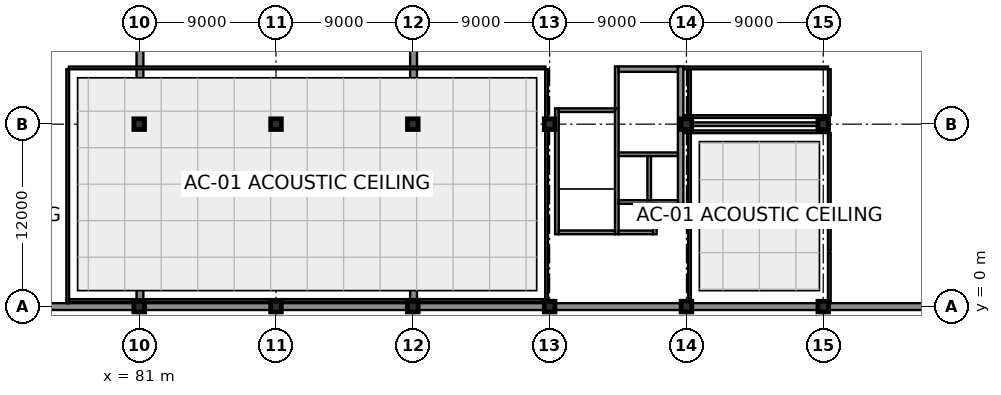
"""IFC4 building model, lengths in metres.
Left out: names, types, materials, properties, quantities, classifications, styles, units other than length and angle.
Written with IfcOpenShell. Run it as: python <this file> out.ifc"""

import sys

from ifc_helpers import new_model, si_unit, direction, frame, frame_2d, origin, origin_2d, place, context, subcontext, project, spatial, rectangle, extrude, element, fill, save


model = new_model("IFC4")
c1 = context("Model", 3, precision=1e-05, world=origin(), true_north=direction((0.0, 1.0)))
c2 = subcontext(c1, "Body", "Model", "MODEL_VIEW")
j1 = project(units=[si_unit("LENGTHUNIT", "METRE"), si_unit("PLANEANGLEUNIT", "RADIAN")], contexts=[c1])
p1 = place(None, origin())
s1 = spatial("IfcSite", under=j1, at=p1, CompositionType="ELEMENT")
p2 = place(p1, origin())
s2 = spatial("IfcBuilding", under=s1, at=p2, CompositionType="ELEMENT")
p3 = place(p2, frame((0.0, 0.0, -4.5)))
s3 = spatial("IfcBuildingStorey", under=s2, at=p3, CompositionType="ELEMENT", Elevation=-4.5)
for number, where, z_axis, x_axis in (
    (1, (81.0, 0.0, 0.0), (0.0, 0.0, 1.0), (1.0, 0.0, 0.0)),
    (2, (81.0, 12.0, 0.0), (0.0, 0.0, 1.0), (1.0, 0.0, 0.0)),
    (3, (90.0, 0.0, 0.0), (0.0, 0.0, 1.0), (1.0, 0.0, 0.0)),
    (4, (90.0, 12.0, 0.0), (0.0, 0.0, 1.0), (1.0, 0.0, 0.0)),
    (5, (99.0, 0.0, 0.0), (0.0, 0.0, 1.0), (1.0, 0.0, 0.0)),
    (6, (99.0, 12.0, 0.0), (0.0, 0.0, 1.0), (1.0, 0.0, 0.0)),
    (7, (108.0, 0.0, 0.0), (0.0, 0.0, 1.0), (1.0, 0.0, 0.0)),
    (8, (108.0, 12.0, 0.0), (0.0, 0.0, 1.0), (1.0, 0.0, 0.0)),
    (9, (117.0, 0.0, 0.0), (0.0, 0.0, 1.0), (1.0, 0.0, 0.0)),
    (10, (117.0, 12.0, 0.0), (0.0, 0.0, 1.0), (1.0, 0.0, 0.0)),
    (11, (126.0, 0.0, 0.0), (0.0, 0.0, 1.0), (1.0, 0.0, 0.0)),
    (12, (126.0, 12.0, 0.0), (0.0, 0.0, 1.0), (1.0, 0.0, 0.0)),
):
    element("IfcColumn", number, at=place(p3, frame(where, z_axis=z_axis, x_axis=x_axis)), inside=s3, PredefinedType="COLUMN", context=c2, shape_type="SweptSolid", body=[
        extrude(rectangle(XDim=0.7, YDim=0.7, at=origin_2d()), origin(), (0.0, 0.0, 1.0), 4.5),
    ])
p4 = place(p3, frame((99.396, 0.0, 0.0), z_axis=(0.0, 0.0, 1.0), x_axis=(1.0, 0.0, 0.0)))
e13 = element("IfcWall", 13, at=p4, inside=s3, PredefinedType="USERDEFINED", context=c2, shape_type="SweptSolid", body=[
    extrude(rectangle(XDim=8.258, YDim=0.45, at=frame_2d((4.129, 0.0))), origin(), (0.0, 0.0, 1.0), 4.32),
])
for number, where, z_axis, x_axis in (
    (14, (108.346, 0.0, 0.0), (0.0, 0.0, 1.0), (1.0, 0.0, 0.0)),
    (15, (117.346, 0.0, 0.0), (0.0, 0.0, 1.0), (1.0, 0.0, 0.0)),
):
    element("IfcWall", number, at=place(p3, frame(where, z_axis=z_axis, x_axis=x_axis)), inside=s3, PredefinedType="USERDEFINED", context=c2, shape_type="SweptSolid", body=[
        extrude(rectangle(XDim=8.308, YDim=0.45, at=frame_2d((4.154, 0.0))), origin(), (0.0, 0.0, 1.0), 4.32),
    ])
p5 = place(p3, frame((126.346, 0.0, 0.0), z_axis=(0.0, 0.0, 1.0), x_axis=(1.0, 0.0, 0.0)))
e16 = element("IfcWall", 16, at=p5, inside=s3, PredefinedType="USERDEFINED", context=c2, shape_type="SweptSolid", body=[
    extrude(rectangle(XDim=8.308, YDim=0.45, at=frame_2d((4.154, 0.0))), origin(), (0.0, 0.0, 1.0), 4.32),
])
p6 = place(p3, frame((99.05, 23.654, 0.0), z_axis=(0.0, 0.0, 1.0), x_axis=(0.0, -1.0, 0.0)))
e17 = element("IfcWall", 17, at=p6, inside=s3, PredefinedType="USERDEFINED", context=c2, shape_type="SweptSolid", body=[
    extrude(rectangle(XDim=11.308, YDim=0.45, at=frame_2d((5.654, 0.0))), origin(), (0.0, 0.0, 1.0), 4.32),
])
p7 = place(p3, frame((99.05, 11.654, 0.0), z_axis=(0.0, 0.0, 1.0), x_axis=(0.0, -1.0, 0.0)))
e18 = element("IfcWall", 18, at=p7, inside=s3, PredefinedType="USERDEFINED", context=c2, shape_type="SweptSolid", body=[
    extrude(rectangle(XDim=11.308, YDim=0.45, at=frame_2d((5.654, 0.0))), origin(), (0.0, 0.0, 1.0), 4.32),
])
for number, where, z_axis, x_axis in (
    (19, (81.396, 0.0, 0.0), (0.0, 0.0, 1.0), (1.0, 0.0, 0.0)),
    (20, (90.346, 0.0, 0.0), (0.0, 0.0, 1.0), (1.0, 0.0, 0.0)),
):
    element("IfcWall", number, at=place(p3, frame(where, z_axis=z_axis, x_axis=x_axis)), inside=s3, PredefinedType="USERDEFINED", context=c2, shape_type="SweptSolid", body=[
        extrude(rectangle(XDim=8.258, YDim=0.45, at=frame_2d((4.129, 0.0))), origin(), (0.0, 0.0, 1.0), 4.32),
    ])
p8 = place(p3, frame((81.05, 23.654, 0.0), z_axis=(0.0, 0.0, 1.0), x_axis=(0.0, -1.0, 0.0)))
e21 = element("IfcWall", 21, at=p8, inside=s3, PredefinedType="USERDEFINED", context=c2, shape_type="SweptSolid", body=[
    extrude(rectangle(XDim=11.308, YDim=0.45, at=frame_2d((5.654, 0.0))), origin(), (0.0, 0.0, 1.0), 4.32),
])
p9 = place(p3, frame((81.05, 11.654, 0.0), z_axis=(0.0, 0.0, 1.0), x_axis=(0.0, -1.0, 0.0)))
e22 = element("IfcWall", 22, at=p9, inside=s3, PredefinedType="USERDEFINED", context=c2, shape_type="SweptSolid", body=[
    extrude(rectangle(XDim=11.308, YDim=0.45, at=frame_2d((5.654, 0.0))), origin(), (0.0, 0.0, 1.0), 4.32),
])
p10 = place(p3, frame((72.346, 0.0, 0.0), z_axis=(0.0, 0.0, 1.0), x_axis=(1.0, 0.0, 0.0)))
e23 = element("IfcWall", 23, at=p10, inside=s3, PredefinedType="USERDEFINED", context=c2, shape_type="SweptSolid", body=[
    extrude(rectangle(XDim=8.258, YDim=0.45, at=frame_2d((4.129, 0.0))), origin(), (0.0, 0.0, 1.0), 4.32),
])
p11 = place(p3, frame((108.48, 4.76, 0.0), z_axis=(0.0, 0.0, 1.0), x_axis=(0.0, 1.0, 0.0)))
e24 = element("IfcWall", 24, at=p11, inside=s3, PredefinedType="SHEAR", context=c2, shape_type="SweptSolid", body=[
    extrude(rectangle(XDim=8.28, YDim=0.24, at=frame_2d((4.14, 0.0))), origin(), (0.0, 0.0, 1.0), 4.31),
])
p12 = place(p3, frame((112.42, 4.76, 0.0), z_axis=(0.0, 0.0, 1.0), x_axis=(0.0, 1.0, 0.0)))
e25 = element("IfcWall", 25, at=p12, inside=s3, PredefinedType="SHEAR", context=c2, shape_type="SweptSolid", body=[
    extrude(rectangle(XDim=8.28, YDim=0.24, at=frame_2d((4.14, 0.0))), origin(), (0.0, 0.0, 1.0), 4.31),
])
p13 = place(p12, frame((6.49, 0.0, 0.0)))
e26 = element("IfcOpeningElement", 26, at=p13, cuts=e25, PredefinedType="OPENING", context=c2, shape_type="SweptSolid", body=[
    extrude(rectangle(XDim=1.3, YDim=2.2, at=frame_2d((0.65, 1.1))), frame((0.0, 0.135, 0.0), z_axis=(0.0, -1.0, 0.0), x_axis=(1.0, 0.0, 0.0)), (0.0, 0.0, 1.0), 0.27),
])
for number, where, z_axis, x_axis in (
    (27, (108.6, 4.88, 0.0), (0.0, 0.0, 1.0), (1.0, 0.0, 0.0)),
    (28, (108.6, 12.92, 0.0), (0.0, 0.0, 1.0), (1.0, 0.0, 0.0)),
):
    element("IfcWall", number, at=place(p3, frame(where, z_axis=z_axis, x_axis=x_axis)), inside=s3, PredefinedType="SHEAR", context=c2, shape_type="SweptSolid", body=[
        extrude(rectangle(XDim=3.7, YDim=0.24, at=frame_2d((1.85, 0.0))), origin(), (0.0, 0.0, 1.0), 4.31),
    ])
p14 = place(p3, frame((112.42, 13.04, 0.0), z_axis=(0.0, 0.0, 1.0), x_axis=(0.0, 1.0, 0.0)))
e29 = element("IfcWall", 29, at=p14, inside=s3, PredefinedType="SHEAR", context=c2, shape_type="SweptSolid", body=[
    extrude(rectangle(XDim=2.76, YDim=0.24, at=frame_2d((1.38, 0.0))), origin(), (0.0, 0.0, 1.0), 4.16),
])
p15 = place(p3, frame((112.54, 15.62, 0.0), z_axis=(0.0, 0.0, 1.0), x_axis=(1.0, 0.0, 0.0)))
e30 = element("IfcWall", 30, at=p15, inside=s3, PredefinedType="SHEAR", context=c2, shape_type="SweptSolid", body=[
    extrude(rectangle(XDim=3.9, YDim=0.36, at=frame_2d((1.95, 0.0))), origin(), (0.0, 0.0, 1.0), 4.16),
])
p16 = place(p15, frame((1.15, 0.0, 0.0)))
e31 = element("IfcOpeningElement", 31, at=p16, cuts=e30, PredefinedType="OPENING", context=c2, shape_type="SweptSolid", body=[
    extrude(rectangle(XDim=1.6, YDim=2.25, at=frame_2d((0.8, 1.125))), frame((0.0, 0.195, 0.0), z_axis=(0.0, -1.0, 0.0), x_axis=(1.0, 0.0, 0.0)), (0.0, 0.0, 1.0), 0.39),
])
p17 = place(p3, frame((116.62, 6.76, 0.0), z_axis=(0.0, 0.0, 1.0), x_axis=(0.0, 1.0, 0.0)))
e32 = element("IfcWall", 32, at=p17, inside=s3, PredefinedType="SHEAR", context=c2, shape_type="SweptSolid", body=[
    extrude(rectangle(XDim=9.04, YDim=0.36, at=frame_2d((4.52, 0.0))), origin(), (0.0, 0.0, 1.0), 4.16),
])
p18 = place(p3, frame((112.54, 10.02, 0.0), z_axis=(0.0, 0.0, 1.0), x_axis=(1.0, 0.0, 0.0)))
e33 = element("IfcWall", 33, at=p18, inside=s3, PredefinedType="SHEAR", context=c2, shape_type="SweptSolid", body=[
    extrude(rectangle(XDim=3.9, YDim=0.24, at=frame_2d((1.95, 0.0))), origin(), (0.0, 0.0, 1.0), 4.31),
])
p19 = place(p18, frame((0.235, 0.0, 0.0)))
e34 = element("IfcOpeningElement", 34, at=p19, cuts=e33, PredefinedType="OPENING", context=c2, shape_type="SweptSolid", body=[
    extrude(rectangle(XDim=1.6, YDim=2.3, at=frame_2d((0.8, 1.15))), frame((0.0, 0.135, 0.0), z_axis=(0.0, -1.0, 0.0), x_axis=(1.0, 0.0, 0.0)), (0.0, 0.0, 1.0), 0.27),
])
p20 = place(p18, frame((2.185, 0.0, 0.0)))
e35 = element("IfcOpeningElement", 35, at=p20, cuts=e33, PredefinedType="OPENING", context=c2, shape_type="SweptSolid", body=[
    extrude(rectangle(XDim=1.6, YDim=2.3, at=frame_2d((0.8, 1.15))), frame((0.0, 0.135, 0.0), z_axis=(0.0, -1.0, 0.0), x_axis=(1.0, 0.0, 0.0)), (0.0, 0.0, 1.0), 0.27),
])
p21 = place(p3, frame((112.54, 6.88, 0.0), z_axis=(0.0, 0.0, 1.0), x_axis=(1.0, 0.0, 0.0)))
e36 = element("IfcWall", 36, at=p21, inside=s3, PredefinedType="SHEAR", context=c2, shape_type="SweptSolid", body=[
    extrude(rectangle(XDim=3.9, YDim=0.24, at=frame_2d((1.95, 0.0))), origin(), (0.0, 0.0, 1.0), 4.31),
])
p22 = place(p3, frame((114.55, 7.0, 0.0), z_axis=(0.0, 0.0, 1.0), x_axis=(0.0, 1.0, 0.0)))
e37 = element("IfcWall", 37, at=p22, inside=s3, PredefinedType="SHEAR", context=c2, shape_type="SweptSolid", body=[
    extrude(rectangle(XDim=2.9, YDim=0.24, at=frame_2d((1.45, 0.0))), origin(), (0.0, 0.0, 1.0), 4.31),
])
p23 = place(p3, frame((114.92, 4.76, 0.0), z_axis=(0.0, 0.0, 1.0), x_axis=(0.0, 1.0, 0.0)))
e38 = element("IfcWall", 38, at=p23, inside=s3, PredefinedType="SHEAR", context=c2, shape_type="SweptSolid", body=[
    extrude(rectangle(XDim=2.0, YDim=0.24, at=frame_2d((1.0, 0.0))), origin(), (0.0, 0.0, 1.0), 4.31),
])
p24 = place(p3, frame((112.54, 4.88, 0.0), z_axis=(0.0, 0.0, 1.0), x_axis=(1.0, 0.0, 0.0)))
e39 = element("IfcWall", 39, at=p24, inside=s3, PredefinedType="SHEAR", context=c2, shape_type="SweptSolid", body=[
    extrude(rectangle(XDim=2.26, YDim=0.24, at=frame_2d((1.13, 0.0))), origin(), (0.0, 0.0, 1.0), 4.31),
])
p25 = place(p3, frame((117.346, 12.0, 0.0), z_axis=(0.0, 0.0, 1.0), x_axis=(1.0, 0.0, 0.0)))
e40 = element("IfcWall", 40, at=p25, inside=s3, PredefinedType="SHEAR", context=c2, shape_type="SweptSolid", body=[
    extrude(rectangle(XDim=8.308, YDim=0.24, at=frame_2d((4.154, 0.0))), origin(), (0.0, 0.0, 1.0), 3.685),
])
p26 = place(p3, frame((107.8, 15.62, 0.0), z_axis=(0.0, 0.0, 1.0), x_axis=(0.0, -1.0, 0.0)))
e41 = element("IfcWall", 41, at=p26, inside=s3, PredefinedType="PARTITIONING", context=c2, shape_type="SweptSolid", body=[
    extrude(rectangle(XDim=15.14, YDim=0.18, at=frame_2d((7.57, 0.0))), origin(), (0.0, 0.0, 1.0), 3.825),
])
p27 = place(p3, frame((107.72, 0.4, 0.0), z_axis=(0.0, 0.0, 1.0), x_axis=(-1.0, 0.0, 0.0)))
e42 = element("IfcWall", 42, at=p27, inside=s3, PredefinedType="PARTITIONING", context=c2, shape_type="SweptSolid", body=[
    extrude(rectangle(XDim=31.34, YDim=0.18, at=frame_2d((15.67, 0.0))), origin(), (0.0, 0.0, 1.0), 4.14),
])
p28 = place(p3, frame((76.3, 0.22, 0.0), z_axis=(0.0, 0.0, 1.0), x_axis=(0.0, 1.0, 0.0)))
e43 = element("IfcWall", 43, at=p28, inside=s3, PredefinedType="PARTITIONING", context=c2, shape_type="SweptSolid", body=[
    extrude(rectangle(XDim=15.4, YDim=0.18, at=frame_2d((7.7, 0.0))), origin(), (0.0, 0.0, 1.0), 4.14),
])
p29 = place(p3, frame((76.38, 15.7, 0.0), z_axis=(0.0, 0.0, 1.0), x_axis=(1.0, 0.0, 0.0)))
e44 = element("IfcWall", 44, at=p29, inside=s3, PredefinedType="PARTITIONING", context=c2, shape_type="SweptSolid", body=[
    extrude(rectangle(XDim=31.34, YDim=0.18, at=frame_2d((15.67, 0.0))), origin(), (0.0, 0.0, 1.0), 4.14),
])
p30 = place(p29, frame((14.945, 0.0, 0.0)))
e45 = element("IfcOpeningElement", 45, at=p30, cuts=e44, PredefinedType="OPENING", context=c2, shape_type="SweptSolid", body=[
    extrude(rectangle(XDim=1.45, YDim=2.3, at=frame_2d((0.725, 1.15))), frame((0.0, 0.105, 0.0), z_axis=(0.0, -1.0, 0.0), x_axis=(1.0, 0.0, 0.0)), (0.0, 0.0, 1.0), 0.21),
])
p31 = place(p29, frame((28.69, 0.0, 1.05)))
e46 = element("IfcOpeningElement", 46, at=p31, cuts=e44, PredefinedType="OPENING", context=c2, shape_type="SweptSolid", body=[
    extrude(rectangle(XDim=1.8, YDim=1.1, at=frame_2d((0.9, 0.55))), frame((0.0, 0.105, 0.0), z_axis=(0.0, -1.0, 0.0), x_axis=(1.0, 0.0, 0.0)), (0.0, 0.0, 1.0), 0.21),
])
p32 = place(p3, frame((126.4, 3.52, 0.0), z_axis=(0.0, 0.0, 1.0), x_axis=(0.0, -1.0, 0.0)))
e47 = element("IfcWall", 47, at=p32, inside=s3, PredefinedType="PARTITIONING", context=c2, shape_type="SweptSolid", body=[
    extrude(rectangle(XDim=3.174, YDim=0.18, at=frame_2d((1.587, 0.0))), origin(), (0.0, 0.0, 1.0), 4.14),
])
p33 = place(p3, frame((117.2, 0.48, 0.0), z_axis=(0.0, 0.0, 1.0), x_axis=(0.0, 1.0, 0.0)))
e48 = element("IfcWall", 48, at=p33, inside=s3, PredefinedType="PARTITIONING", context=c2, shape_type="SweptSolid", body=[
    extrude(rectangle(XDim=10.94, YDim=0.18, at=frame_2d((5.47, 0.0))), origin(), (0.0, 0.0, 1.0), 3.785),
])
p34 = place(p3, frame((116.795, 11.5, 0.0), z_axis=(0.0, 0.0, 1.0), x_axis=(1.0, 0.0, 0.0)))
e49 = element("IfcWall", 49, at=p34, inside=s3, PredefinedType="PARTITIONING", context=c2, shape_type="SweptSolid", body=[
    extrude(rectangle(XDim=9.525, YDim=0.18, at=frame_2d((4.763, 0.0))), origin(), (0.0, 0.0, 1.0), 4.14),
])
p35 = place(p3, frame((126.4, 11.42, 0.0), z_axis=(0.0, 0.0, 1.0), x_axis=(0.0, -1.0, 0.0)))
e50 = element("IfcWall", 50, at=p35, inside=s3, PredefinedType="PARTITIONING", context=c2, shape_type="SweptSolid", body=[
    extrude(rectangle(XDim=7.74, YDim=0.18, at=frame_2d((3.87, 0.0))), origin(), (0.0, 0.0, 1.0), 4.14),
])
p36 = place(p35, frame((3.295, 0.0, 0.0)))
e51 = element("IfcOpeningElement", 51, at=p36, cuts=e50, PredefinedType="OPENING", context=c2, shape_type="SweptSolid", body=[
    extrude(rectangle(XDim=1.15, YDim=2.15, at=frame_2d((0.575, 1.075))), frame((0.0, 0.105, 0.0), z_axis=(0.0, -1.0, 0.0), x_axis=(1.0, 0.0, 0.0)), (0.0, 0.0, 1.0), 0.21),
])
p37 = place(p3, frame((117.2, 12.58, 0.0), z_axis=(0.0, 0.0, 1.0), x_axis=(0.0, 1.0, 0.0)))
e52 = element("IfcWall", 52, at=p37, inside=s3, PredefinedType="PARTITIONING", context=c2, shape_type="SweptSolid", body=[
    extrude(rectangle(XDim=3.04, YDim=0.18, at=frame_2d((1.52, 0.0))), origin(), (0.0, 0.0, 1.0), 3.785),
])
p38 = place(p3, frame((116.795, 15.7, 0.0), z_axis=(0.0, 0.0, 1.0), x_axis=(1.0, 0.0, 0.0)))
e53 = element("IfcWall", 53, at=p38, inside=s3, PredefinedType="PARTITIONING", context=c2, shape_type="SweptSolid", body=[
    extrude(rectangle(XDim=9.525, YDim=0.18, at=frame_2d((4.763, 0.0))), origin(), (0.0, 0.0, 1.0), 4.14),
])
p39 = place(p38, frame((4.288, 0.0, 0.0)))
e54 = element("IfcOpeningElement", 54, at=p39, cuts=e53, PredefinedType="OPENING", context=c2, shape_type="SweptSolid", body=[
    extrude(rectangle(XDim=0.95, YDim=2.1, at=frame_2d((0.475, 1.05))), frame((0.0, 0.105, 0.0), z_axis=(0.0, -1.0, 0.0), x_axis=(1.0, 0.0, 0.0)), (0.0, 0.0, 1.0), 0.21),
])
p40 = place(p38, frame((7.175, 0.0, 1.05)))
e55 = element("IfcOpeningElement", 55, at=p40, cuts=e53, PredefinedType="OPENING", context=c2, shape_type="SweptSolid", body=[
    extrude(rectangle(XDim=1.5, YDim=1.1, at=frame_2d((0.75, 0.55))), frame((0.0, 0.105, 0.0), z_axis=(0.0, -1.0, 0.0), x_axis=(1.0, 0.0, 0.0)), (0.0, 0.0, 1.0), 0.21),
])
p41 = place(p3, frame((126.4, 15.62, 0.0), z_axis=(0.0, 0.0, 1.0), x_axis=(0.0, -1.0, 0.0)))
e56 = element("IfcWall", 56, at=p41, inside=s3, PredefinedType="PARTITIONING", context=c2, shape_type="SweptSolid", body=[
    extrude(rectangle(XDim=3.04, YDim=0.18, at=frame_2d((1.52, 0.0))), origin(), (0.0, 0.0, 1.0), 4.14),
])
p42 = place(p3, frame((126.32, 12.5, 0.0), z_axis=(0.0, 0.0, 1.0), x_axis=(-1.0, 0.0, 0.0)))
e57 = element("IfcWall", 57, at=p42, inside=s3, PredefinedType="PARTITIONING", context=c2, shape_type="SweptSolid", body=[
    extrude(rectangle(XDim=9.525, YDim=0.18, at=frame_2d((4.763, 0.0))), origin(), (0.0, 0.0, 1.0), 4.14),
])
p43 = place(p13, frame((1.3, 0.0, 0.0), z_axis=(0.0, 0.0, 1.0), x_axis=(-1.0, 0.0, 0.0)))
e58 = element("IfcDoor", 58, at=p43, inside=s3, OperationType="SINGLE_SWING_LEFT", PredefinedType="DOOR", context=c2, shape_type="SweptSolid", body=[
    extrude(rectangle(XDim=1.3, YDim=2.2, at=frame_2d((0.65, 1.1))), frame((0.0, 0.025, 0.0), z_axis=(0.0, -1.0, 0.0), x_axis=(1.0, 0.0, 0.0)), (0.0, 0.0, 1.0), 0.05),
])
fill(e26, e58)
p44 = place(p16, origin())
e59 = element("IfcDoor", 59, at=p44, inside=s3, OperationType="DOUBLE_DOOR_SINGLE_SWING", PredefinedType="DOOR", context=c2, shape_type="SweptSolid", body=[
    extrude(rectangle(XDim=1.6, YDim=2.25, at=frame_2d((0.8, 1.125))), frame((0.0, 0.025, 0.0), z_axis=(0.0, -1.0, 0.0), x_axis=(1.0, 0.0, 0.0)), (0.0, 0.0, 1.0), 0.05),
])
fill(e31, e59)
p45 = place(p19, origin())
e60 = element("IfcDoor", 60, at=p45, inside=s3, OperationType="DOUBLE_DOOR_SLIDING", PredefinedType="DOOR", context=c2, shape_type="SweptSolid", body=[
    extrude(rectangle(XDim=1.6, YDim=2.3, at=frame_2d((0.8, 1.15))), frame((0.0, 0.025, 0.0), z_axis=(0.0, -1.0, 0.0), x_axis=(1.0, 0.0, 0.0)), (0.0, 0.0, 1.0), 0.05),
])
fill(e34, e60)
p46 = place(p20, origin())
e61 = element("IfcDoor", 61, at=p46, inside=s3, OperationType="DOUBLE_DOOR_SLIDING", PredefinedType="DOOR", context=c2, shape_type="SweptSolid", body=[
    extrude(rectangle(XDim=1.6, YDim=2.3, at=frame_2d((0.8, 1.15))), frame((0.0, 0.025, 0.0), z_axis=(0.0, -1.0, 0.0), x_axis=(1.0, 0.0, 0.0)), (0.0, 0.0, 1.0), 0.05),
])
fill(e35, e61)
p47 = place(p30, frame((1.45, 0.0, 0.0), z_axis=(0.0, 0.0, 1.0), x_axis=(-1.0, 0.0, 0.0)))
e62 = element("IfcDoor", 62, at=p47, inside=s3, OperationType="DOUBLE_DOOR_SINGLE_SWING", PredefinedType="DOOR", context=c2, shape_type="SweptSolid", body=[
    extrude(rectangle(XDim=1.45, YDim=2.3, at=frame_2d((0.725, 1.15))), frame((0.0, 0.025, 0.0), z_axis=(0.0, -1.0, 0.0), x_axis=(1.0, 0.0, 0.0)), (0.0, 0.0, 1.0), 0.05),
])
fill(e45, e62)
p48 = place(p31, origin())
e63 = element("IfcWindow", 63, at=p48, inside=s3, PartitioningType="SINGLE_PANEL", PredefinedType="WINDOW", context=c2, shape_type="SweptSolid", body=[
    extrude(rectangle(XDim=1.8, YDim=1.1, at=frame_2d((0.9, 0.55))), frame((0.0, 0.03, 0.0), z_axis=(0.0, -1.0, 0.0), x_axis=(1.0, 0.0, 0.0)), (0.0, 0.0, 1.0), 0.06),
])
fill(e46, e63)
p49 = place(p36, origin())
e64 = element("IfcDoor", 64, at=p49, inside=s3, OperationType="SINGLE_SWING_RIGHT", PredefinedType="DOOR", context=c2, shape_type="SweptSolid", body=[
    extrude(rectangle(XDim=1.15, YDim=2.15, at=frame_2d((0.575, 1.075))), frame((0.0, 0.025, 0.0), z_axis=(0.0, -1.0, 0.0), x_axis=(1.0, 0.0, 0.0)), (0.0, 0.0, 1.0), 0.05),
])
fill(e51, e64)
p50 = place(p39, frame((0.95, 0.0, 0.0), z_axis=(0.0, 0.0, 1.0), x_axis=(-1.0, 0.0, 0.0)))
e65 = element("IfcDoor", 65, at=p50, inside=s3, OperationType="SINGLE_SWING_LEFT", PredefinedType="DOOR", context=c2, shape_type="SweptSolid", body=[
    extrude(rectangle(XDim=0.95, YDim=2.1, at=frame_2d((0.475, 1.05))), frame((0.0, 0.025, 0.0), z_axis=(0.0, -1.0, 0.0), x_axis=(1.0, 0.0, 0.0)), (0.0, 0.0, 1.0), 0.05),
])
fill(e54, e65)
p51 = place(p40, origin())
e66 = element("IfcWindow", 66, at=p51, inside=s3, PartitioningType="SINGLE_PANEL", PredefinedType="WINDOW", context=c2, shape_type="SweptSolid", body=[
    extrude(rectangle(XDim=1.5, YDim=1.1, at=frame_2d((0.75, 0.55))), frame((0.0, 0.03, 0.0), z_axis=(0.0, -1.0, 0.0), x_axis=(1.0, 0.0, 0.0)), (0.0, 0.0, 1.0), 0.06),
])
fill(e55, e66)
save(model, sys.argv[1])
